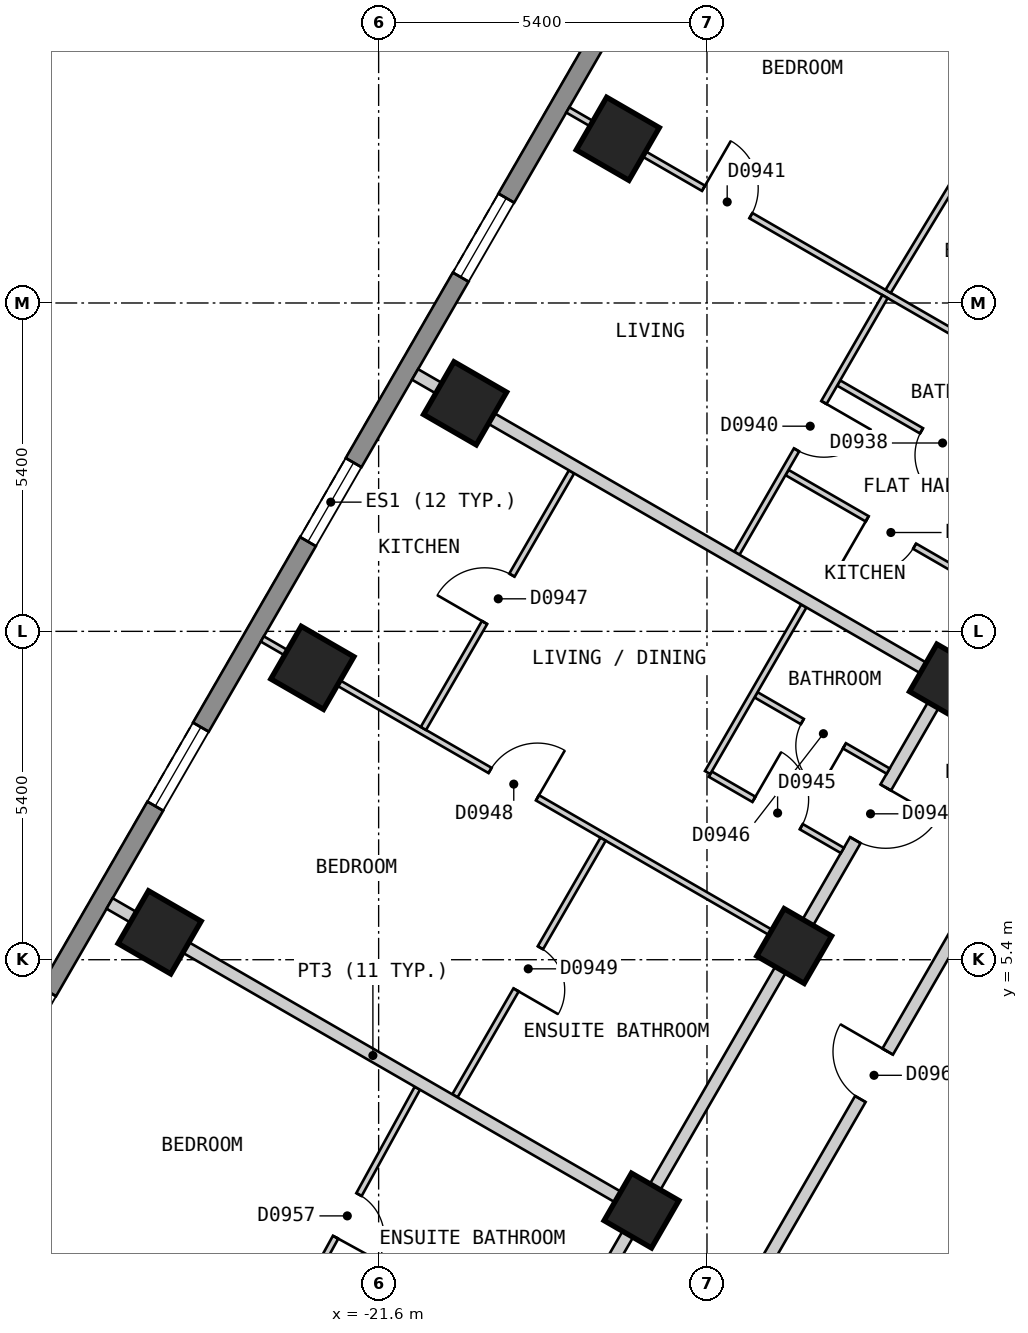
"""IFC4 building model, lengths in metres.
Left out: names, types, materials, properties, quantities, classifications, styles, units other than length and angle.
Written with IfcOpenShell. Run it as: python <this file> out.ifc"""

import sys

from ifc_helpers import new_model, si_unit, direction, frame, frame_2d, origin, origin_2d, place, context, subcontext, project, spatial, polyline, rectangle, outline, extrude, element, fill, save


model = new_model("IFC4")
c1 = context("Model", 3, precision=1e-05, world=origin(), true_north=direction((0.0, 1.0)))
c2 = subcontext(c1, "Body", "Model", "MODEL_VIEW")
j1 = project(units=[si_unit("LENGTHUNIT", "METRE"), si_unit("PLANEANGLEUNIT", "RADIAN")], contexts=[c1])
p1 = place(None, origin())
s1 = spatial("IfcSite", under=j1, at=p1, CompositionType="ELEMENT")
p2 = place(p1, origin())
s2 = spatial("IfcBuilding", under=s1, at=p2, CompositionType="ELEMENT")
p3 = place(p2, frame((0.0, 0.0, 90.0)))
s3 = spatial("IfcBuildingStorey", under=s2, at=p3, CompositionType="ELEMENT", Elevation=90.0)
for number, where, z_axis, x_axis in (
    (1, (-17.667, 18.9, 0.0), (0.0, 0.0, 1.0), (-0.5, -0.866, 0.0)),
    (2, (-20.178, 14.55, 0.0), (0.0, 0.0, 1.0), (-0.5, -0.866, 0.0)),
    (3, (-22.69, 10.2, 0.0), (0.0, 0.0, 1.0), (-0.5, -0.866, 0.0)),
    (4, (-25.202, 5.85, 0.0), (0.0, 0.0, 1.0), (-0.5, -0.866, 0.0)),
):
    element("IfcColumn", number, at=place(p3, frame(where, z_axis=z_axis, x_axis=x_axis)), inside=s3, PredefinedType="COLUMN", context=c2, shape_type="SweptSolid", body=[
        extrude(rectangle(XDim=1.0, YDim=1.0, at=origin_2d()), origin(), (0.0, 0.0, 1.0), 3.0),
    ])
for number, where, z_axis, x_axis in (
    (5, (-12.254, 9.975, 0.0), (0.0, 0.0, 1.0), (-0.5, -0.866, 0.0)),
    (6, (-14.766, 5.625, 0.0), (0.0, 0.0, 1.0), (-0.5, -0.866, 0.0)),
    (7, (-17.277, 1.275, 0.0), (0.0, 0.0, 1.0), (-0.5, -0.866, 0.0)),
):
    element("IfcColumn", number, at=place(p3, frame(where, z_axis=z_axis, x_axis=x_axis)), inside=s3, PredefinedType="COLUMN", context=c2, shape_type="SweptSolid", body=[
        extrude(rectangle(XDim=0.9, YDim=0.9, at=origin_2d()), origin(), (0.0, 0.0, 1.0), 3.0),
    ])
p4 = place(p3, frame((-15.747, 24.425, 0.0), z_axis=(0.0, 0.0, 1.0), x_axis=(-0.500027479704, -0.866009537788, 0.0)))
e8 = element("IfcWall", 8, at=p4, inside=s3, PredefinedType="SOLIDWALL", context=c2, shape_type="SweptSolid", body=[
    extrude(outline(polyline([(0.0, -0.15), (26.559, -0.15), (26.478, 0.15), (0.08, 0.15), (0.0, -0.15)])), origin(), (0.0, 0.0, 1.0), 2.7),
])
p5 = place(p4, frame((2.483, 0.0, 0.15)))
e9 = element("IfcOpeningElement", 9, at=p5, cuts=e8, PredefinedType="OPENING", context=c2, shape_type="SweptSolid", body=[
    extrude(rectangle(XDim=1.5, YDim=2.1, at=frame_2d((0.75, 1.05))), frame((0.0, 0.16, 0.0), z_axis=(0.0, -1.0, 0.0), x_axis=(1.0, 0.0, 0.0)), (0.0, 0.0, 1.0), 0.32),
])
p6 = place(p4, frame((7.506, 0.0, 0.15)))
e10 = element("IfcOpeningElement", 10, at=p6, cuts=e8, PredefinedType="OPENING", context=c2, shape_type="SweptSolid", body=[
    extrude(rectangle(XDim=1.5, YDim=2.1, at=frame_2d((0.75, 1.05))), frame((0.0, 0.16, 0.0), z_axis=(0.0, -1.0, 0.0), x_axis=(1.0, 0.0, 0.0)), (0.0, 0.0, 1.0), 0.32),
])
p7 = place(p4, frame((12.529, 0.0, 0.15)))
e11 = element("IfcOpeningElement", 11, at=p7, cuts=e8, PredefinedType="OPENING", context=c2, shape_type="SweptSolid", body=[
    extrude(rectangle(XDim=1.5, YDim=2.1, at=frame_2d((0.75, 1.05))), frame((0.0, 0.16, 0.0), z_axis=(0.0, -1.0, 0.0), x_axis=(1.0, 0.0, 0.0)), (0.0, 0.0, 1.0), 0.32),
])
p8 = place(p4, frame((17.552, 0.0, 0.15)))
e12 = element("IfcOpeningElement", 12, at=p8, cuts=e8, PredefinedType="OPENING", context=c2, shape_type="SweptSolid", body=[
    extrude(rectangle(XDim=1.5, YDim=2.1, at=frame_2d((0.75, 1.05))), frame((0.0, 0.16, 0.0), z_axis=(0.0, -1.0, 0.0), x_axis=(1.0, 0.0, 0.0)), (0.0, 0.0, 1.0), 0.32),
])
p9 = place(p4, frame((22.575, 0.0, 0.15)))
e13 = element("IfcOpeningElement", 13, at=p9, cuts=e8, PredefinedType="OPENING", context=c2, shape_type="SweptSolid", body=[
    extrude(rectangle(XDim=1.5, YDim=2.1, at=frame_2d((0.75, 1.05))), frame((0.0, 0.16, 0.0), z_axis=(0.0, -1.0, 0.0), x_axis=(1.0, 0.0, 0.0)), (0.0, 0.0, 1.0), 0.32),
])
p10 = place(p3, frame((-16.05, -1.0, 0.0), z_axis=(0.0, 0.0, 1.0), x_axis=(0.499962449088, 0.866047082728, 0.0)))
e14 = element("IfcWall", 14, at=p10, inside=s3, PredefinedType="PARTITIONING", context=c2, shape_type="SweptSolid", body=[
    extrude(rectangle(XDim=10.391, YDim=0.2, at=frame_2d((5.195, 0.0))), origin(), (0.0, 0.0, 1.0), 2.7),
])
p11 = place(p10, frame((4.745, 0.0, 0.0)))
e15 = element("IfcOpeningElement", 15, at=p11, cuts=e14, PredefinedType="OPENING", context=c2, shape_type="SweptSolid", body=[
    extrude(rectangle(XDim=0.9, YDim=2.1, at=frame_2d((0.45, 1.05))), frame((0.0, 0.11, 0.0), z_axis=(0.0, -1.0, 0.0), x_axis=(1.0, 0.0, 0.0)), (0.0, 0.0, 1.0), 0.22),
])
p12 = place(p3, frame((-18.562, -0.951, 0.0), z_axis=(0.0, 0.0, 1.0), x_axis=(0.499987097491, 0.866032852923, 0.0)))
e16 = element("IfcWall", 16, at=p12, inside=s3, PredefinedType="PARTITIONING", context=c2, shape_type="SweptSolid", body=[
    extrude(rectangle(XDim=20.15, YDim=0.2, at=frame_2d((10.075, 0.0))), origin(), (0.0, 0.0, 1.0), 2.7),
])
p13 = place(p12, frame((14.627, 0.0, 0.0)))
e17 = element("IfcOpeningElement", 17, at=p13, cuts=e16, PredefinedType="OPENING", context=c2, shape_type="SweptSolid", body=[
    extrude(rectangle(XDim=1.0, YDim=2.1, at=frame_2d((0.5, 1.05))), frame((0.0, 0.11, 0.0), z_axis=(0.0, -1.0, 0.0), x_axis=(1.0, 0.0, 0.0)), (0.0, 0.0, 1.0), 0.22),
])
p14 = place(p12, frame((9.604, 0.0, 0.0)))
e18 = element("IfcOpeningElement", 18, at=p14, cuts=e16, PredefinedType="OPENING", context=c2, shape_type="SweptSolid", body=[
    extrude(rectangle(XDim=1.0, YDim=2.1, at=frame_2d((0.5, 1.05))), frame((0.0, 0.11, 0.0), z_axis=(0.0, -1.0, 0.0), x_axis=(1.0, 0.0, 0.0)), (0.0, 0.0, 1.0), 0.22),
])
p15 = place(p3, frame((-16.146, 8.452, 0.0), z_axis=(0.0, 0.0, 1.0), x_axis=(0.865983051302, -0.500073349477, 0.0)))
e19 = element("IfcWall", 19, at=p15, inside=s3, PredefinedType="PARTITIONING", context=c2, shape_type="SweptSolid", body=[
    extrude(rectangle(XDim=2.509, YDim=0.1, at=frame_2d((1.255, 0.0))), origin(), (0.0, 0.0, 1.0), 2.7),
])
p16 = place(p15, frame((0.829, 0.0, 0.0)))
e20 = element("IfcOpeningElement", 20, at=p16, cuts=e19, PredefinedType="OPENING", context=c2, shape_type="SweptSolid", body=[
    extrude(rectangle(XDim=0.9, YDim=2.1, at=frame_2d((0.45, 1.05))), frame((0.0, 0.06, 0.0), z_axis=(0.0, -1.0, 0.0), x_axis=(1.0, 0.0, 0.0)), (0.0, 0.0, 1.0), 0.12),
])
p17 = place(p3, frame((-23.513, 10.675, 0.0), z_axis=(0.0, 0.0, 1.0), x_axis=(0.866041268327, -0.499972520799, 0.0)))
e21 = element("IfcWall", 21, at=p17, inside=s3, PredefinedType="PARTITIONING", context=c2, shape_type="SweptSolid", body=[
    extrude(rectangle(XDim=10.0, YDim=0.1, at=frame_2d((5.0, 0.0))), origin(), (0.0, 0.0, 1.0), 2.7),
])
p18 = place(p17, frame((4.325, 0.0, 0.0)))
e22 = element("IfcOpeningElement", 22, at=p18, cuts=e21, PredefinedType="OPENING", context=c2, shape_type="SweptSolid", body=[
    extrude(rectangle(XDim=0.9, YDim=2.1, at=frame_2d((0.45, 1.05))), frame((0.0, 0.06, 0.0), z_axis=(0.0, -1.0, 0.0), x_axis=(1.0, 0.0, 0.0)), (0.0, 0.0, 1.0), 0.12),
])
p19 = place(p3, frame((-14.884, 13.412, 0.0), z_axis=(0.0, 0.0, 1.0), x_axis=(0.866024880635, -0.500000906121, 0.0)))
e23 = element("IfcWall", 23, at=p19, inside=s3, PredefinedType="PARTITIONING", context=c2, shape_type="SweptSolid", body=[
    extrude(rectangle(XDim=3.896, YDim=0.1, at=frame_2d((1.948, 0.0))), origin(), (0.0, 0.0, 1.0), 2.7),
])
p20 = place(p19, frame((1.523, 0.0, 0.0)))
e24 = element("IfcOpeningElement", 24, at=p20, cuts=e23, PredefinedType="OPENING", context=c2, shape_type="SweptSolid", body=[
    extrude(rectangle(XDim=0.9, YDim=2.1, at=frame_2d((0.45, 1.05))), frame((0.0, 0.06, 0.0), z_axis=(0.0, -1.0, 0.0), x_axis=(1.0, 0.0, 0.0)), (0.0, 0.0, 1.0), 0.12),
])
p21 = place(p3, frame((-14.034, 14.884, 0.0), z_axis=(0.0, 0.0, 1.0), x_axis=(0.866024880635, -0.500000906121, 0.0)))
e25 = element("IfcWall", 25, at=p21, inside=s3, PredefinedType="PARTITIONING", context=c2, shape_type="SweptSolid", body=[
    extrude(rectangle(XDim=3.896, YDim=0.1, at=frame_2d((1.948, 0.0))), origin(), (0.0, 0.0, 1.0), 2.7),
])
p22 = place(p21, frame((1.573, 0.0, 0.0)))
e26 = element("IfcOpeningElement", 26, at=p22, cuts=e25, PredefinedType="OPENING", context=c2, shape_type="SweptSolid", body=[
    extrude(rectangle(XDim=0.8, YDim=2.1, at=frame_2d((0.4, 1.05))), frame((0.0, 0.06, 0.0), z_axis=(0.0, -1.0, 0.0), x_axis=(1.0, 0.0, 0.0)), (0.0, 0.0, 1.0), 0.12),
])
p23 = place(p3, frame((-15.394, 9.757, 0.0), z_axis=(0.0, 0.0, 1.0), x_axis=(0.866038211682, -0.499977815414, 0.0)))
e27 = element("IfcWall", 27, at=p23, inside=s3, PredefinedType="PARTITIONING", context=c2, shape_type="SweptSolid", body=[
    extrude(rectangle(XDim=2.51, YDim=0.1, at=frame_2d((1.255, 0.0))), origin(), (0.0, 0.0, 1.0), 2.7),
])
p24 = place(p23, frame((0.88, 0.0, 0.0)))
e28 = element("IfcOpeningElement", 28, at=p24, cuts=e27, PredefinedType="OPENING", context=c2, shape_type="SweptSolid", body=[
    extrude(rectangle(XDim=0.8, YDim=2.1, at=frame_2d((0.4, 1.05))), frame((0.0, 0.06, 0.0), z_axis=(0.0, -1.0, 0.0), x_axis=(1.0, 0.0, 0.0)), (0.0, 0.0, 1.0), 0.12),
])
p25 = place(p3, frame((-18.489, 19.375, 0.0), z_axis=(0.0, 0.0, 1.0), x_axis=(0.866016855193, -0.500014806302, 0.0)))
e29 = element("IfcWall", 29, at=p25, inside=s3, PredefinedType="PARTITIONING", context=c2, shape_type="SweptSolid", body=[
    extrude(rectangle(XDim=10.0, YDim=0.1, at=frame_2d((5.0, 0.0))), origin(), (0.0, 0.0, 1.0), 2.7),
])
p26 = place(p25, frame((2.577, 0.0, 0.0)))
e30 = element("IfcOpeningElement", 30, at=p26, cuts=e29, PredefinedType="OPENING", context=c2, shape_type="SweptSolid", body=[
    extrude(rectangle(XDim=0.9, YDim=2.1, at=frame_2d((0.45, 1.05))), frame((0.0, 0.06, 0.0), z_axis=(0.0, -1.0, 0.0), x_axis=(1.0, 0.0, 0.0)), (0.0, 0.0, 1.0), 0.12),
])
p27 = place(p3, frame((-13.221, 16.391, 0.0), z_axis=(0.0, 0.0, 1.0), x_axis=(0.518164725284, 0.855280841286, 0.0)))
e31 = element("IfcWall", 31, at=p27, inside=s3, PredefinedType="PARTITIONING", context=c2, shape_type="SweptSolid", body=[
    extrude(rectangle(XDim=4.74, YDim=0.1, at=frame_2d((2.37, 0.0))), origin(), (0.0, 0.0, 1.0), 2.7),
])
p28 = place(p27, frame((2.002, 0.0, 0.0)))
e32 = element("IfcOpeningElement", 32, at=p28, cuts=e31, PredefinedType="OPENING", context=c2, shape_type="SweptSolid", body=[
    extrude(rectangle(XDim=0.8, YDim=2.1, at=frame_2d((0.4, 1.05))), frame((0.0, 0.06, 0.0), z_axis=(0.0, -1.0, 0.0), x_axis=(1.0, 0.0, 0.0)), (0.0, 0.0, 1.0), 0.12),
])
p29 = place(p3, frame((-16.19, 8.478, 0.0), z_axis=(0.0, 0.0, 1.0), x_axis=(0.500156715107, 0.865934905367, 0.0)))
e33 = element("IfcWall", 33, at=p29, inside=s3, PredefinedType="PARTITIONING", context=c2, shape_type="SweptSolid", body=[
    extrude(rectangle(XDim=3.163, YDim=0.1, at=frame_2d((1.582, 0.0))), origin(), (0.0, 0.0, 1.0), 2.7),
])
p30 = place(p3, frame((-20.345, 3.162, 0.0), z_axis=(0.0, 0.0, 1.0), x_axis=(0.499943653708, 0.866057932887, 0.0)))
e34 = element("IfcWall", 34, at=p30, inside=s3, PredefinedType="PARTITIONING", context=c2, shape_type="SweptSolid", body=[
    extrude(rectangle(XDim=4.873, YDim=0.1, at=frame_2d((2.436, 0.0))), origin(), (0.0, 0.0, 1.0), 2.7),
])
p31 = place(p30, frame((2.011, 0.0, 0.0)))
e35 = element("IfcOpeningElement", 35, at=p31, cuts=e34, PredefinedType="OPENING", context=c2, shape_type="SweptSolid", body=[
    extrude(rectangle(XDim=0.8, YDim=2.1, at=frame_2d((0.4, 1.05))), frame((0.0, 0.06, 0.0), z_axis=(0.0, -1.0, 0.0), x_axis=(1.0, 0.0, 0.0)), (0.0, 0.0, 1.0), 0.12),
])
p32 = place(p3, frame((-15.708, 12.085, 0.0), z_axis=(0.0, 0.0, 1.0), x_axis=(0.499943653708, 0.866057932887, 0.0)))
e36 = element("IfcWall", 36, at=p32, inside=s3, PredefinedType="PARTITIONING", context=c2, shape_type="SweptSolid", body=[
    extrude(rectangle(XDim=4.873, YDim=0.1, at=frame_2d((2.436, 0.0))), origin(), (0.0, 0.0, 1.0), 2.7),
])
p33 = place(p32, frame((1.962, 0.0, 0.0)))
e37 = element("IfcOpeningElement", 37, at=p33, cuts=e36, PredefinedType="OPENING", context=c2, shape_type="SweptSolid", body=[
    extrude(rectangle(XDim=0.9, YDim=2.1, at=frame_2d((0.45, 1.05))), frame((0.0, 0.06, 0.0), z_axis=(0.0, -1.0, 0.0), x_axis=(1.0, 0.0, 0.0)), (0.0, 0.0, 1.0), 0.12),
])
p34 = place(p3, frame((-20.864, 9.203, 0.0), z_axis=(0.0, 0.0, 1.0), x_axis=(0.500072260509, 0.86598368014, 0.0)))
e38 = element("IfcWall", 38, at=p34, inside=s3, PredefinedType="PARTITIONING", context=c2, shape_type="SweptSolid", body=[
    extrude(rectangle(XDim=4.873, YDim=0.1, at=frame_2d((2.437, 0.0))), origin(), (0.0, 0.0, 1.0), 2.7),
])
p35 = place(p34, frame((2.012, 0.0, 0.0)))
e39 = element("IfcOpeningElement", 39, at=p35, cuts=e38, PredefinedType="OPENING", context=c2, shape_type="SweptSolid", body=[
    extrude(rectangle(XDim=0.9, YDim=2.1, at=frame_2d((0.45, 1.05))), frame((0.0, 0.06, 0.0), z_axis=(0.0, -1.0, 0.0), x_axis=(1.0, 0.0, 0.0)), (0.0, 0.0, 1.0), 0.12),
])
p36 = place(p3, frame((-23.289, -0.951, 0.0), z_axis=(0.0, 0.0, 1.0), x_axis=(0.481164463081, 0.876630343684, 0.0)))
e40 = element("IfcWall", 40, at=p36, inside=s3, PredefinedType="PARTITIONING", context=c2, shape_type="SweptSolid", body=[
    extrude(rectangle(XDim=4.834, YDim=0.1, at=frame_2d((2.417, 0.0))), origin(), (0.0, 0.0, 1.0), 2.7),
])
p37 = place(p36, frame((2.039, 0.0, 0.0)))
e41 = element("IfcOpeningElement", 41, at=p37, cuts=e40, PredefinedType="OPENING", context=c2, shape_type="SweptSolid", body=[
    extrude(rectangle(XDim=0.8, YDim=2.1, at=frame_2d((0.4, 1.05))), frame((0.0, 0.06, 0.0), z_axis=(0.0, -1.0, 0.0), x_axis=(1.0, 0.0, 0.0)), (0.0, 0.0, 1.0), 0.12),
])
p38 = place(p3, frame((-26.025, 6.325, 0.0), z_axis=(0.0, 0.0, 1.0), x_axis=(0.866041268327, -0.499972520799, 0.0)))
e42 = element("IfcWall", 42, at=p38, inside=s3, PredefinedType="PARTITIONING", context=c2, shape_type="SweptSolid", body=[
    extrude(rectangle(XDim=10.0, YDim=0.2, at=frame_2d((5.0, 0.0))), origin(), (0.0, 0.0, 1.0), 2.7),
])
p39 = place(p3, frame((-21.001, 15.025, 0.0), z_axis=(0.0, 0.0, 1.0), x_axis=(0.866016855193, -0.500014806302, 0.0)))
e43 = element("IfcWall", 43, at=p39, inside=s3, PredefinedType="PARTITIONING", context=c2, shape_type="SweptSolid", body=[
    extrude(rectangle(XDim=10.0, YDim=0.2, at=frame_2d((5.0, 0.0))), origin(), (0.0, 0.0, 1.0), 2.7),
])
p40 = place(p6, origin())
e44 = element("IfcWindow", 44, at=p40, inside=s3, PartitioningType="SINGLE_PANEL", PredefinedType="WINDOW", context=c2, shape_type="SweptSolid", body=[
    extrude(rectangle(XDim=1.5, YDim=2.1, at=frame_2d((0.75, 1.05))), frame((0.0, 0.03, 0.0), z_axis=(0.0, -1.0, 0.0), x_axis=(1.0, 0.0, 0.0)), (0.0, 0.0, 1.0), 0.06),
])
fill(e10, e44)
p41 = place(p7, origin())
e45 = element("IfcWindow", 45, at=p41, inside=s3, PartitioningType="SINGLE_PANEL", PredefinedType="WINDOW", context=c2, shape_type="SweptSolid", body=[
    extrude(rectangle(XDim=1.5, YDim=2.1, at=frame_2d((0.75, 1.05))), frame((0.0, 0.03, 0.0), z_axis=(0.0, -1.0, 0.0), x_axis=(1.0, 0.0, 0.0)), (0.0, 0.0, 1.0), 0.06),
])
fill(e11, e45)
p42 = place(p8, origin())
e46 = element("IfcWindow", 46, at=p42, inside=s3, PartitioningType="SINGLE_PANEL", PredefinedType="WINDOW", context=c2, shape_type="SweptSolid", body=[
    extrude(rectangle(XDim=1.5, YDim=2.1, at=frame_2d((0.75, 1.05))), frame((0.0, 0.03, 0.0), z_axis=(0.0, -1.0, 0.0), x_axis=(1.0, 0.0, 0.0)), (0.0, 0.0, 1.0), 0.06),
])
fill(e12, e46)
p43 = place(p22, origin())
e47 = element("IfcDoor", 47, at=p43, inside=s3, OperationType="SINGLE_SWING_RIGHT", PredefinedType="DOOR", context=c2, shape_type="SweptSolid", body=[
    extrude(rectangle(XDim=0.8, YDim=2.1, at=frame_2d((0.4, 1.05))), frame((0.0, 0.025, 0.0), z_axis=(0.0, -1.0, 0.0), x_axis=(1.0, 0.0, 0.0)), (0.0, 0.0, 1.0), 0.05),
])
fill(e26, e47)
p44 = place(p20, origin())
e48 = element("IfcDoor", 48, at=p44, inside=s3, OperationType="SINGLE_SWING_LEFT", PredefinedType="DOOR", context=c2, shape_type="SweptSolid", body=[
    extrude(rectangle(XDim=0.9, YDim=2.1, at=frame_2d((0.45, 1.05))), frame((0.0, 0.025, 0.0), z_axis=(0.0, -1.0, 0.0), x_axis=(1.0, 0.0, 0.0)), (0.0, 0.0, 1.0), 0.05),
])
fill(e24, e48)
p45 = place(p33, origin())
e49 = element("IfcDoor", 49, at=p45, inside=s3, OperationType="SINGLE_SWING_RIGHT", PredefinedType="DOOR", context=c2, shape_type="SweptSolid", body=[
    extrude(rectangle(XDim=0.9, YDim=2.1, at=frame_2d((0.45, 1.05))), frame((0.0, 0.025, 0.0), z_axis=(0.0, -1.0, 0.0), x_axis=(1.0, 0.0, 0.0)), (0.0, 0.0, 1.0), 0.05),
])
fill(e37, e49)
p46 = place(p26, origin())
e50 = element("IfcDoor", 50, at=p46, inside=s3, OperationType="SINGLE_SWING_LEFT", PredefinedType="DOOR", context=c2, shape_type="SweptSolid", body=[
    extrude(rectangle(XDim=0.9, YDim=2.1, at=frame_2d((0.45, 1.05))), frame((0.0, 0.025, 0.0), z_axis=(0.0, -1.0, 0.0), x_axis=(1.0, 0.0, 0.0)), (0.0, 0.0, 1.0), 0.05),
])
fill(e30, e50)
p47 = place(p14, origin())
e51 = element("IfcDoor", 51, at=p47, inside=s3, OperationType="SINGLE_SWING_RIGHT", PredefinedType="DOOR", context=c2, shape_type="SweptSolid", body=[
    extrude(rectangle(XDim=1.0, YDim=2.1, at=frame_2d((0.5, 1.05))), frame((0.0, 0.025, 0.0), z_axis=(0.0, -1.0, 0.0), x_axis=(1.0, 0.0, 0.0)), (0.0, 0.0, 1.0), 0.05),
])
fill(e18, e51)
p48 = place(p16, origin())
e52 = element("IfcDoor", 52, at=p48, inside=s3, OperationType="SINGLE_SWING_LEFT", PredefinedType="DOOR", context=c2, shape_type="SweptSolid", body=[
    extrude(rectangle(XDim=0.9, YDim=2.1, at=frame_2d((0.45, 1.05))), frame((0.0, 0.025, 0.0), z_axis=(0.0, -1.0, 0.0), x_axis=(1.0, 0.0, 0.0)), (0.0, 0.0, 1.0), 0.05),
])
fill(e20, e52)
p49 = place(p24, origin())
e53 = element("IfcDoor", 53, at=p49, inside=s3, OperationType="SINGLE_SWING_RIGHT", PredefinedType="DOOR", context=c2, shape_type="SweptSolid", body=[
    extrude(rectangle(XDim=0.8, YDim=2.1, at=frame_2d((0.4, 1.05))), frame((0.0, 0.025, 0.0), z_axis=(0.0, -1.0, 0.0), x_axis=(1.0, 0.0, 0.0)), (0.0, 0.0, 1.0), 0.05),
])
fill(e28, e53)
p50 = place(p35, origin())
e54 = element("IfcDoor", 54, at=p50, inside=s3, OperationType="SINGLE_SWING_LEFT", PredefinedType="DOOR", context=c2, shape_type="SweptSolid", body=[
    extrude(rectangle(XDim=0.9, YDim=2.1, at=frame_2d((0.45, 1.05))), frame((0.0, 0.025, 0.0), z_axis=(0.0, -1.0, 0.0), x_axis=(1.0, 0.0, 0.0)), (0.0, 0.0, 1.0), 0.05),
])
fill(e39, e54)
p51 = place(p18, origin())
e55 = element("IfcDoor", 55, at=p51, inside=s3, OperationType="SINGLE_SWING_RIGHT", PredefinedType="DOOR", context=c2, shape_type="SweptSolid", body=[
    extrude(rectangle(XDim=0.9, YDim=2.1, at=frame_2d((0.45, 1.05))), frame((0.0, 0.025, 0.0), z_axis=(0.0, -1.0, 0.0), x_axis=(1.0, 0.0, 0.0)), (0.0, 0.0, 1.0), 0.05),
])
fill(e22, e55)
p52 = place(p31, origin())
e56 = element("IfcDoor", 56, at=p52, inside=s3, OperationType="SINGLE_SWING_LEFT", PredefinedType="DOOR", context=c2, shape_type="SweptSolid", body=[
    extrude(rectangle(XDim=0.8, YDim=2.1, at=frame_2d((0.4, 1.05))), frame((0.0, 0.025, 0.0), z_axis=(0.0, -1.0, 0.0), x_axis=(1.0, 0.0, 0.0)), (0.0, 0.0, 1.0), 0.05),
])
fill(e35, e56)
p53 = place(p37, origin())
e57 = element("IfcDoor", 57, at=p53, inside=s3, OperationType="SINGLE_SWING_LEFT", PredefinedType="DOOR", context=c2, shape_type="SweptSolid", body=[
    extrude(rectangle(XDim=0.8, YDim=2.1, at=frame_2d((0.4, 1.05))), frame((0.0, 0.025, 0.0), z_axis=(0.0, -1.0, 0.0), x_axis=(1.0, 0.0, 0.0)), (0.0, 0.0, 1.0), 0.05),
])
fill(e41, e57)
p54 = place(p11, origin())
e58 = element("IfcDoor", 58, at=p54, inside=s3, OperationType="SINGLE_SWING_RIGHT", PredefinedType="DOOR", context=c2, shape_type="SweptSolid", body=[
    extrude(rectangle(XDim=0.9, YDim=2.1, at=frame_2d((0.45, 1.05))), frame((0.0, 0.025, 0.0), z_axis=(0.0, -1.0, 0.0), x_axis=(1.0, 0.0, 0.0)), (0.0, 0.0, 1.0), 0.05),
])
fill(e15, e58)
save(model, sys.argv[1])
